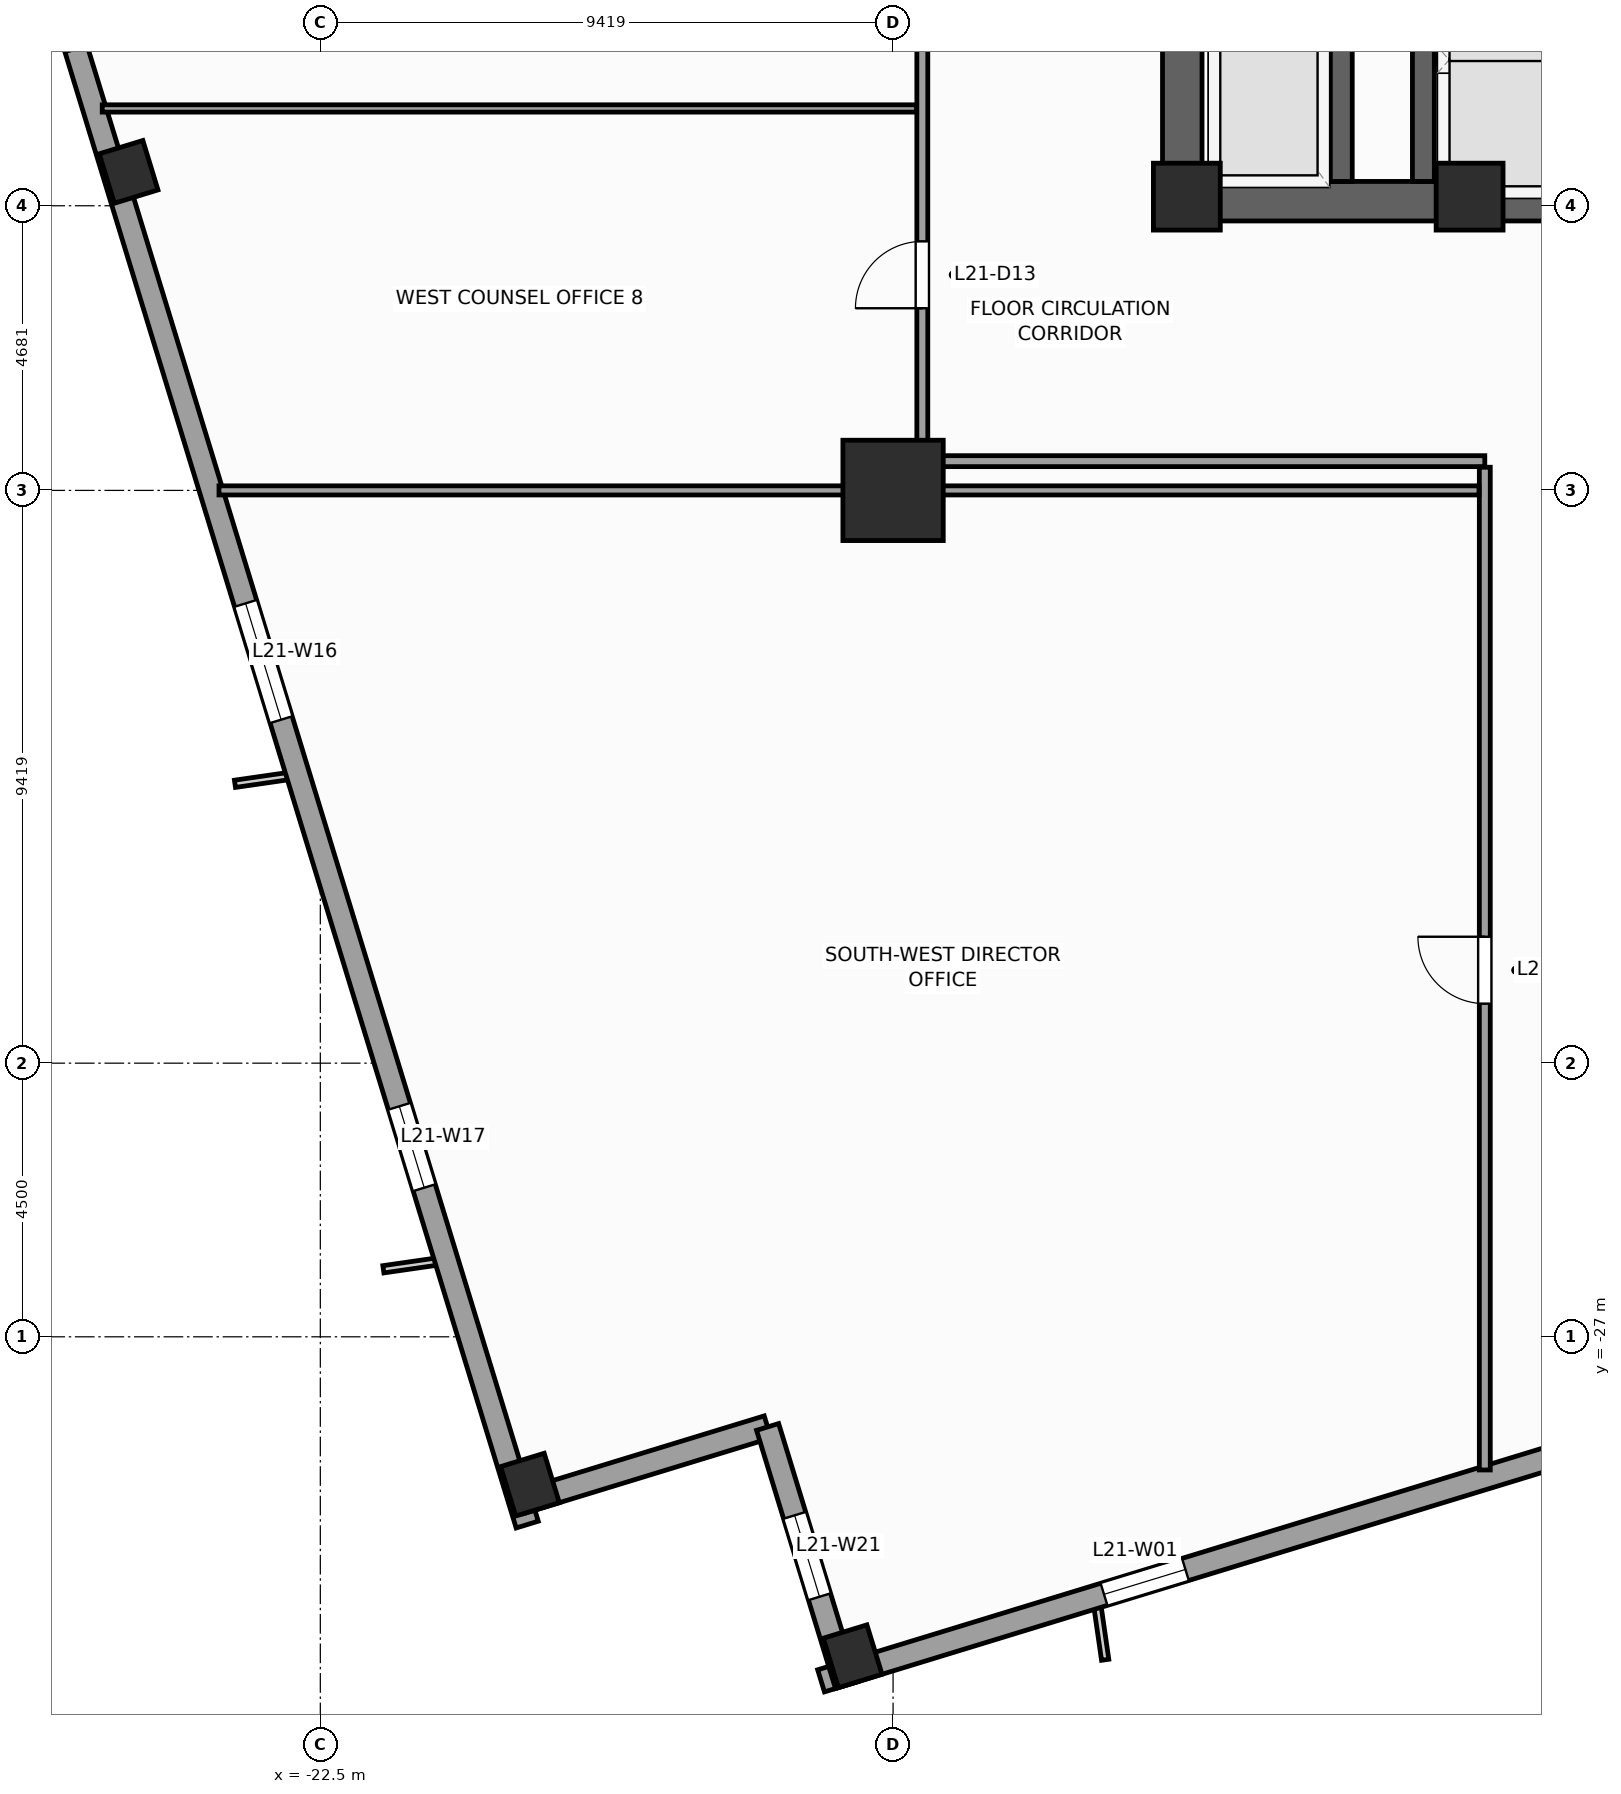
"""IFC4 building model, lengths in metres.
Left out: names, types, materials, properties, quantities, classifications, styles, units other than length and angle.
Written with IfcOpenShell. Run it as: python <this file> out.ifc"""

import sys

from ifc_helpers import new_model, si_unit, direction, frame, frame_2d, origin, origin_2d, place, context, subcontext, project, spatial, rectangle, extrude, source, transform, mapped, element, fill, save


model = new_model("IFC4")
c1 = context("Model", 3, precision=1e-05, world=origin(), true_north=direction((0.0, 1.0)))
c2 = subcontext(c1, "Body", "Model", "MODEL_VIEW")
j1 = project(units=[si_unit("LENGTHUNIT", "METRE"), si_unit("PLANEANGLEUNIT", "RADIAN")], contexts=[c1])
p1 = place(None, origin())
s1 = spatial("IfcSite", under=j1, at=p1, CompositionType="ELEMENT")
p2 = place(p1, origin())
s2 = spatial("IfcBuilding", under=s1, at=p2, CompositionType="ELEMENT")
p3 = place(p2, frame((0.0, 0.0, 91.2)))
s3 = spatial("IfcBuildingStorey", under=s2, at=p3, CompositionType="ELEMENT", Elevation=91.2)
p4 = place(p3, frame((-8.65, -8.325, 0.0), z_axis=(0.0, 0.0, 1.0), x_axis=(1.0, 0.0, 0.0)))
e1 = element("IfcWall", 1, at=p4, inside=s3, PredefinedType="SHEAR", context=c2, shape_type="SweptSolid", body=[
    extrude(rectangle(XDim=17.3, YDim=0.65, at=frame_2d((8.65, 0.0))), origin(), (0.0, 0.0, 1.0), 4.0),
])
p5 = place(p4, frame((8.0, 0.0, 0.0)))
e2 = element("IfcOpeningElement", 2, at=p5, cuts=e1, PredefinedType="OPENING", context=c2, shape_type="SweptSolid", body=[
    extrude(rectangle(XDim=1.3, YDim=2.2, at=frame_2d((0.65, 1.1))), frame((0.0, 0.335, 0.0), z_axis=(0.0, -1.0, 0.0), x_axis=(1.0, 0.0, 0.0)), (0.0, 0.0, 1.0), 0.67),
])
p6 = place(p3, frame((-8.325, -8.0, 0.0), z_axis=(0.0, 0.0, 1.0), x_axis=(0.0, 1.0, 0.0)))
e3 = element("IfcWall", 3, at=p6, inside=s3, PredefinedType="SHEAR", context=c2, shape_type="SweptSolid", body=[
    extrude(rectangle(XDim=16.0, YDim=0.65, at=frame_2d((8.0, 0.0))), origin(), (0.0, 0.0, 1.0), 4.0),
])
p7 = place(p6, frame((4.69, 0.0, 0.0)))
e4 = element("IfcOpeningElement", 4, at=p7, cuts=e3, PredefinedType="OPENING", context=c2, shape_type="SweptSolid", body=[
    extrude(rectangle(XDim=1.3, YDim=2.2, at=frame_2d((0.65, 1.1))), frame((0.0, 0.335, 0.0), z_axis=(0.0, -1.0, 0.0), x_axis=(1.0, 0.0, 0.0)), (0.0, 0.0, 1.0), 0.67),
])
p8 = place(p3, frame((-4.36, -8.0, 0.0), z_axis=(0.0, 0.0, 1.0), x_axis=(0.0, 1.0, 0.0)))
e5 = element("IfcWall", 5, at=p8, inside=s3, PredefinedType="SHEAR", context=c2, shape_type="SweptSolid", body=[
    extrude(rectangle(XDim=16.0, YDim=0.36, at=frame_2d((8.0, 0.0))), origin(), (0.0, 0.0, 1.0), 4.0),
])
p9 = place(p3, frame((-5.71, -8.0, 0.0), z_axis=(0.0, 0.0, 1.0), x_axis=(0.0, 1.0, 0.0)))
e6 = element("IfcWall", 6, at=p9, inside=s3, PredefinedType="SHEAR", context=c2, shape_type="SweptSolid", body=[
    extrude(rectangle(XDim=2.54, YDim=0.36, at=frame_2d((1.27, 0.0))), origin(), (0.0, 0.0, 1.0), 4.0),
])
m1 = source(origin(), c2, "Body", "SweptSolid", [
    extrude(rectangle(XDim=1.1, YDim=1.1, at=origin_2d()), origin(), (0.0, 0.0, 1.0), 4.0),
])
for number, where, z_axis, x_axis in (
    (7, (-8.25, -8.25, 0.0), (0.0, 0.0, 1.0), (1.0, 0.0, 0.0)),
    (8, (-3.6, -8.25, 0.0), (0.0, 0.0, 1.0), (1.0, 0.0, 0.0)),
):
    element("IfcColumn", number, at=place(p3, frame(where, z_axis=z_axis, x_axis=x_axis)), inside=s3, PredefinedType="PILASTER", context=c2, shape_type="MappedRepresentation", body=[
        mapped(m1, transform((0.0, 0.0, 0.0), scale=1.0)),
    ])
m2 = source(origin(), c2, "Body", "SweptSolid", [
    extrude(rectangle(XDim=1.65, YDim=1.65, at=origin_2d()), origin(), (0.0, 0.0, 1.0), 4.0),
])
p10 = place(p3, frame((-13.081, -13.081, 0.0), z_axis=(0.0, 0.0, 1.0), x_axis=(1.0, 0.0, 0.0)))
e9 = element("IfcColumn", 9, at=p10, inside=s3, PredefinedType="COLUMN", context=c2, shape_type="MappedRepresentation", body=[
    mapped(m2, transform((0.0, 0.0, 0.0), scale=1.0)),
])
m3 = source(origin(), c2, "Body", "SweptSolid", [
    extrude(rectangle(XDim=0.75, YDim=0.85, at=origin_2d()), origin(), (0.0, 0.0, 1.0), 4.0),
])
for number, where, z_axis, x_axis in (
    (10, (-13.746, -32.253, 0.0), (0.0, 0.0, 1.0), (0.956, 0.292, 0.0)),
    (11, (-25.653, -7.843, 0.0), (0.0, 0.0, 1.0), (0.956, 0.292, 0.0)),
    (12, (-19.052, -29.431, 0.0), (0.0, 0.0, 1.0), (0.956, 0.292, 0.0)),
):
    element("IfcColumn", number, at=place(p3, frame(where, z_axis=z_axis, x_axis=x_axis)), inside=s3, PredefinedType="COLUMN", context=c2, shape_type="MappedRepresentation", body=[
        mapped(m3, transform((0.0, 0.0, 0.0), scale=1.0)),
    ])
p11 = place(p3, frame((-14.265, -32.658, 0.0), z_axis=(0.0, 0.0, 1.0), x_axis=(0.956304320851, 0.292373127906, 0.0)))
e13 = element("IfcWall", 13, at=p11, inside=s3, PredefinedType="STANDARD", context=c2, shape_type="SweptSolid", body=[
    extrude(rectangle(XDim=46.38, YDim=0.38, at=frame_2d((23.19, 0.0))), origin(), (0.0, 0.0, 1.0), 3.14),
])
p12 = place(p11, frame((17.065, 0.0, 0.0)))
e14 = element("IfcOpeningElement", 14, at=p12, cuts=e13, PredefinedType="OPENING", context=c2, shape_type="SweptSolid", body=[
    extrude(rectangle(XDim=1.05, YDim=2.25, at=frame_2d((0.525, 1.125))), frame((0.0, 0.2, 0.0), z_axis=(0.0, -1.0, 0.0), x_axis=(1.0, 0.0, 0.0)), (0.0, 0.0, 1.0), 0.4),
])
p13 = place(p11, frame((4.865, 0.0, 0.51)))
e15 = element("IfcOpeningElement", 15, at=p13, cuts=e13, PredefinedType="OPENING", context=c2, shape_type="SweptSolid", body=[
    extrude(rectangle(XDim=1.4, YDim=2.4, at=frame_2d((0.7, 1.2))), frame((0.0, 0.2, 0.0), z_axis=(0.0, -1.0, 0.0), x_axis=(1.0, 0.0, 0.0)), (0.0, 0.0, 1.0), 0.4),
])
p14 = place(p11, frame((20.512, 0.0, 0.51)))
e16 = element("IfcOpeningElement", 16, at=p14, cuts=e13, PredefinedType="OPENING", context=c2, shape_type="SweptSolid", body=[
    extrude(rectangle(XDim=2.0, YDim=2.4, at=frame_2d((1.0, 1.2))), frame((0.0, 0.2, 0.0), z_axis=(0.0, -1.0, 0.0), x_axis=(1.0, 0.0, 0.0)), (0.0, 0.0, 1.0), 0.4),
])
p15 = place(p11, frame((30.538, 0.0, 0.51)))
e17 = element("IfcOpeningElement", 17, at=p15, cuts=e13, PredefinedType="OPENING", context=c2, shape_type="SweptSolid", body=[
    extrude(rectangle(XDim=2.0, YDim=2.4, at=frame_2d((1.0, 1.2))), frame((0.0, 0.2, 0.0), z_axis=(0.0, -1.0, 0.0), x_axis=(1.0, 0.0, 0.0)), (0.0, 0.0, 1.0), 0.4),
])
p16 = place(p11, frame((39.187, 0.0, 0.51)))
e18 = element("IfcOpeningElement", 18, at=p16, cuts=e13, PredefinedType="OPENING", context=c2, shape_type="SweptSolid", body=[
    extrude(rectangle(XDim=1.4, YDim=2.4, at=frame_2d((0.7, 1.2))), frame((0.0, 0.2, 0.0), z_axis=(0.0, -1.0, 0.0), x_axis=(1.0, 0.0, 0.0)), (0.0, 0.0, 1.0), 0.4),
])
p17 = place(p3, frame((-32.658, 14.265, 0.0), z_axis=(0.0, 0.0, 1.0), x_axis=(0.292373127906, -0.956304320851, 0.0)))
e19 = element("IfcWall", 19, at=p17, inside=s3, PredefinedType="STANDARD", context=c2, shape_type="SweptSolid", body=[
    extrude(rectangle(XDim=46.38, YDim=0.38, at=frame_2d((23.19, 0.0))), origin(), (0.0, 0.0, 1.0), 3.14),
])
p18 = place(p17, frame((4.865, 0.0, 0.51)))
e20 = element("IfcOpeningElement", 20, at=p18, cuts=e19, PredefinedType="OPENING", context=c2, shape_type="SweptSolid", body=[
    extrude(rectangle(XDim=1.4, YDim=2.4, at=frame_2d((0.7, 1.2))), frame((0.0, 0.2, 0.0), z_axis=(0.0, -1.0, 0.0), x_axis=(1.0, 0.0, 0.0)), (0.0, 0.0, 1.0), 0.4),
])
p19 = place(p17, frame((10.95, 0.0, 0.51)))
e21 = element("IfcOpeningElement", 21, at=p19, cuts=e19, PredefinedType="OPENING", context=c2, shape_type="SweptSolid", body=[
    extrude(rectangle(XDim=2.0, YDim=2.4, at=frame_2d((1.0, 1.2))), frame((0.0, 0.2, 0.0), z_axis=(0.0, -1.0, 0.0), x_axis=(1.0, 0.0, 0.0)), (0.0, 0.0, 1.0), 0.4),
])
p20 = place(p17, frame((19.012, 0.0, 0.51)))
e22 = element("IfcOpeningElement", 22, at=p20, cuts=e19, PredefinedType="OPENING", context=c2, shape_type="SweptSolid", body=[
    extrude(rectangle(XDim=2.0, YDim=2.4, at=frame_2d((1.0, 1.2))), frame((0.0, 0.2, 0.0), z_axis=(0.0, -1.0, 0.0), x_axis=(1.0, 0.0, 0.0)), (0.0, 0.0, 1.0), 0.4),
])
p21 = place(p17, frame((30.538, 0.0, 0.51)))
e23 = element("IfcOpeningElement", 23, at=p21, cuts=e19, PredefinedType="OPENING", context=c2, shape_type="SweptSolid", body=[
    extrude(rectangle(XDim=2.0, YDim=2.4, at=frame_2d((1.0, 1.2))), frame((0.0, 0.2, 0.0), z_axis=(0.0, -1.0, 0.0), x_axis=(1.0, 0.0, 0.0)), (0.0, 0.0, 1.0), 0.4),
])
p22 = place(p17, frame((39.187, 0.0, 0.51)))
e24 = element("IfcOpeningElement", 24, at=p22, cuts=e19, PredefinedType="OPENING", context=c2, shape_type="SweptSolid", body=[
    extrude(rectangle(XDim=1.4, YDim=2.4, at=frame_2d((0.7, 1.2))), frame((0.0, 0.2, 0.0), z_axis=(0.0, -1.0, 0.0), x_axis=(1.0, 0.0, 0.0)), (0.0, 0.0, 1.0), 0.4),
])
p23 = place(p3, frame((-19.208, -29.725, 0.0), z_axis=(0.0, 0.0, 1.0), x_axis=(0.956312764915, 0.292345507338, 0.0)))
e25 = element("IfcWall", 25, at=p23, inside=s3, PredefinedType="STANDARD", context=c2, shape_type="SweptSolid", body=[
    extrude(rectangle(XDim=4.25, YDim=0.38, at=frame_2d((2.125, 0.0))), origin(), (0.0, 0.0, 1.0), 3.74),
])
p24 = place(p3, frame((-15.144, -28.482, 0.0), z_axis=(0.0, 0.0, 1.0), x_axis=(0.292373601522, -0.956304176051, 0.0)))
e26 = element("IfcWall", 26, at=p24, inside=s3, PredefinedType="STANDARD", context=c2, shape_type="SweptSolid", body=[
    extrude(rectangle(XDim=4.44, YDim=0.38, at=frame_2d((2.22, 0.0))), origin(), (0.0, 0.0, 1.0), 3.04),
])
p25 = place(p24, frame((1.52, 0.0, 0.51)))
e27 = element("IfcOpeningElement", 27, at=p25, cuts=e26, PredefinedType="OPENING", context=c2, shape_type="SweptSolid", body=[
    extrude(rectangle(XDim=1.4, YDim=2.4, at=frame_2d((0.7, 1.2))), frame((0.0, 0.2, 0.0), z_axis=(0.0, -1.0, 0.0), x_axis=(1.0, 0.0, 0.0)), (0.0, 0.0, 1.0), 0.4),
])
p26 = place(p3, frame((-4.16, -6.0, 0.0), z_axis=(0.0, 0.0, 1.0), x_axis=(1.0, 0.0, 0.0)))
e28 = element("IfcWall", 28, at=p26, inside=s3, PredefinedType="PARTITIONING", context=c2, shape_type="SweptSolid", body=[
    extrude(rectangle(XDim=2.26, YDim=0.12, at=frame_2d((1.13, 0.0))), origin(), (0.0, 0.0, 1.0), 3.74),
])
p27 = place(p3, frame((-12.6, -12.6, 0.0), z_axis=(0.0, 0.0, 1.0), x_axis=(1.0, 0.0, 0.0)))
e29 = element("IfcWall", 29, at=p27, inside=s3, PredefinedType="PARTITIONING", context=c2, shape_type="SweptSolid", body=[
    extrude(rectangle(XDim=9.25, YDim=0.18, at=frame_2d((4.625, 0.0))), origin(), (0.0, 0.0, 1.0), 3.74),
])
p28 = place(p3, frame((-12.6, -12.6, 0.0), z_axis=(0.0, 0.0, 1.0), x_axis=(0.0, 1.0, 0.0)))
e30 = element("IfcWall", 30, at=p28, inside=s3, PredefinedType="PARTITIONING", context=c2, shape_type="SweptSolid", body=[
    extrude(rectangle(XDim=11.45, YDim=0.18, at=frame_2d((5.725, 0.0))), origin(), (0.0, 0.0, 1.0), 3.74),
])
p29 = place(p28, frame((2.514, 0.0, 0.0)))
e31 = element("IfcOpeningElement", 31, at=p29, cuts=e30, PredefinedType="OPENING", context=c2, shape_type="SweptSolid", body=[
    extrude(rectangle(XDim=1.1, YDim=2.2, at=frame_2d((0.55, 1.1))), frame((0.0, 0.1, 0.0), z_axis=(0.0, -1.0, 0.0), x_axis=(1.0, 0.0, 0.0)), (0.0, 0.0, 1.0), 0.2),
])
p30 = place(p3, frame((-3.35, -29.19, 0.0), z_axis=(0.0, 0.0, 1.0), x_axis=(0.0, 1.0, 0.0)))
e32 = element("IfcWall", 32, at=p30, inside=s3, PredefinedType="PARTITIONING", context=c2, shape_type="SweptSolid", body=[
    extrude(rectangle(XDim=16.49, YDim=0.18, at=frame_2d((8.245, 0.0))), origin(), (0.0, 0.0, 1.0), 3.74),
])
p31 = place(p30, frame((7.669, 0.0, 0.0)))
e33 = element("IfcOpeningElement", 33, at=p31, cuts=e32, PredefinedType="OPENING", context=c2, shape_type="SweptSolid", body=[
    extrude(rectangle(XDim=1.1, YDim=2.2, at=frame_2d((0.55, 1.1))), frame((0.0, 0.1, 0.0), z_axis=(0.0, -1.0, 0.0), x_axis=(1.0, 0.0, 0.0)), (0.0, 0.0, 1.0), 0.2),
])
p32 = place(p3, frame((-24.167, -13.081, 0.0), z_axis=(0.0, 0.0, 1.0), x_axis=(1.0, 0.0, 0.0)))
e34 = element("IfcWall", 34, at=p32, inside=s3, PredefinedType="PARTITIONING", context=c2, shape_type="SweptSolid", body=[
    extrude(rectangle(XDim=20.721, YDim=0.15, at=frame_2d((10.361, 0.0))), origin(), (0.0, 0.0, 1.0), 2.732),
])
p33 = place(p3, frame((-26.087, -6.8, 0.0), z_axis=(0.0, 0.0, 1.0), x_axis=(1.0, 0.0, 0.0)))
e35 = element("IfcWall", 35, at=p33, inside=s3, PredefinedType="PARTITIONING", context=c2, shape_type="SweptSolid", body=[
    extrude(rectangle(XDim=13.392, YDim=0.12, at=frame_2d((6.696, 0.0))), origin(), (0.0, 0.0, 1.0), 3.74),
])
m4 = source(origin(), c2, "Body", "SweptSolid", [
    extrude(rectangle(XDim=1.4, YDim=2.4, at=frame_2d((0.7, 1.2))), frame((0.0, 0.03, 0.0), z_axis=(0.0, -1.0, 0.0), x_axis=(1.0, 0.0, 0.0)), (0.0, 0.0, 1.0), 0.06),
])
p34 = place(p13, origin())
e36 = element("IfcWindow", 36, at=p34, inside=s3, PartitioningType="SINGLE_PANEL", PredefinedType="WINDOW", context=c2, shape_type="MappedRepresentation", body=[
    mapped(m4, transform((0.0, 0.0, 0.0), scale=1.0)),
])
fill(e15, e36)
m5 = source(origin(), c2, "Body", "SweptSolid", [
    extrude(rectangle(XDim=2.0, YDim=2.4, at=frame_2d((1.0, 1.2))), frame((0.0, 0.03, 0.0), z_axis=(0.0, -1.0, 0.0), x_axis=(1.0, 0.0, 0.0)), (0.0, 0.0, 1.0), 0.06),
])
p35 = place(p21, origin())
e37 = element("IfcWindow", 37, at=p35, inside=s3, PartitioningType="SINGLE_PANEL", PredefinedType="WINDOW", context=c2, shape_type="MappedRepresentation", body=[
    mapped(m5, transform((0.0, 0.0, 0.0), scale=1.0)),
])
fill(e23, e37)
p36 = place(p22, origin())
e38 = element("IfcWindow", 38, at=p36, inside=s3, PartitioningType="SINGLE_PANEL", PredefinedType="WINDOW", context=c2, shape_type="MappedRepresentation", body=[
    mapped(m4, transform((0.0, 0.0, 0.0), scale=1.0)),
])
fill(e24, e38)
p37 = place(p25, origin())
e39 = element("IfcWindow", 39, at=p37, inside=s3, PartitioningType="SINGLE_PANEL", PredefinedType="WINDOW", context=c2, shape_type="MappedRepresentation", body=[
    mapped(m4, transform((0.0, 0.0, 0.0), scale=1.0)),
])
fill(e27, e39)
m6 = source(origin(), c2, "Body", "SweptSolid", [
    extrude(rectangle(XDim=1.1, YDim=2.2, at=frame_2d((0.55, 1.1))), frame((0.0, 0.025, 0.0), z_axis=(0.0, -1.0, 0.0), x_axis=(1.0, 0.0, 0.0)), (0.0, 0.0, 1.0), 0.05),
])
p38 = place(p29, origin())
e40 = element("IfcDoor", 40, at=p38, inside=s3, OperationType="SINGLE_SWING_LEFT", PredefinedType="DOOR", context=c2, shape_type="MappedRepresentation", body=[
    mapped(m6, transform((0.0, 0.0, 0.0), scale=1.0)),
])
fill(e31, e40)
p39 = place(p31, origin())
e41 = element("IfcDoor", 41, at=p39, inside=s3, OperationType="SINGLE_SWING_RIGHT", PredefinedType="DOOR", context=c2, shape_type="MappedRepresentation", body=[
    mapped(m6, transform((0.0, 0.0, 0.0), scale=1.0)),
])
fill(e33, e41)
save(model, sys.argv[1])
